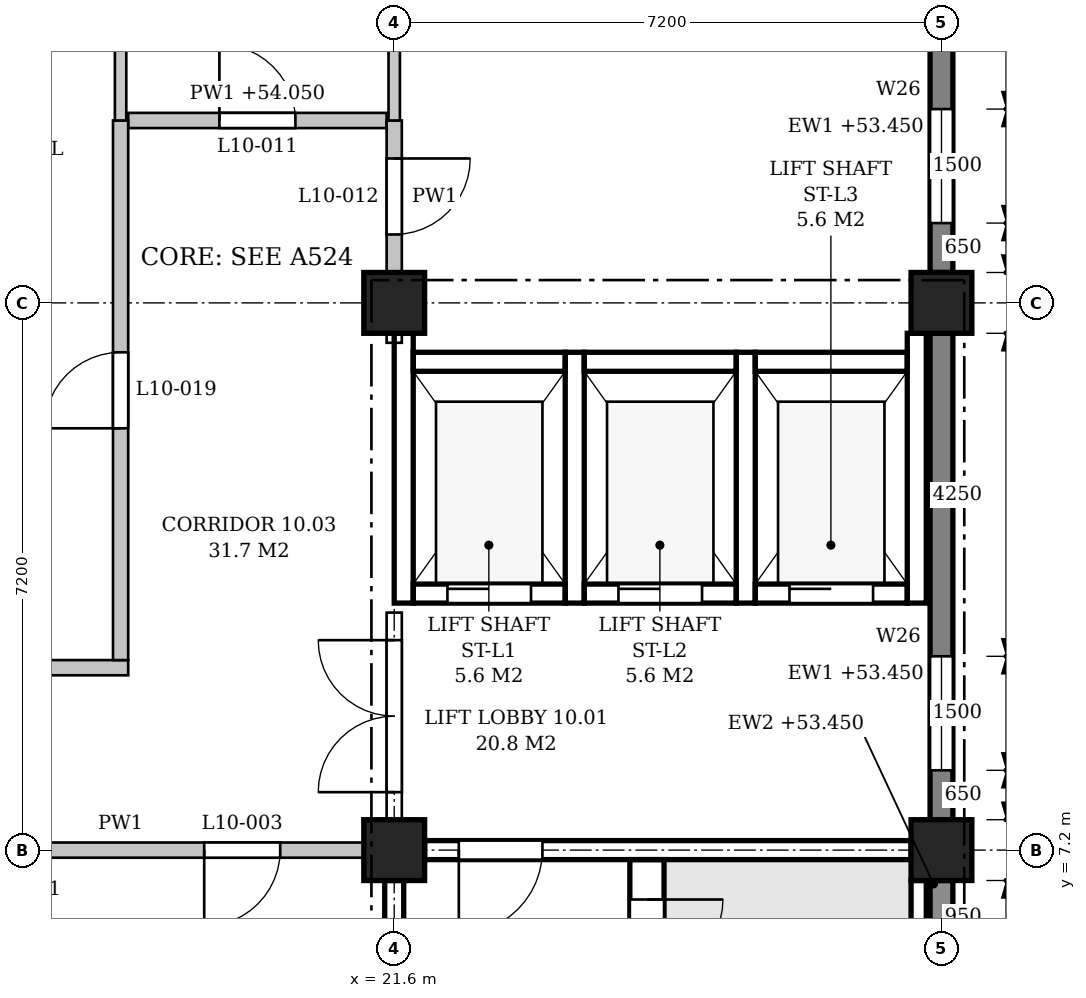
"""IFC4 building model, lengths in metres.
Left out: names, types, materials, properties, quantities, classifications, styles, units other than length and angle.
Written with IfcOpenShell. Run it as: python <this file> out.ifc"""

import sys

from ifc_helpers import new_model, si_unit, direction, frame, frame_2d, origin, origin_2d, place, context, subcontext, project, spatial, polyline, rectangle, outline, extrude, element, fill, save


model = new_model("IFC4")
c1 = context("Model", 3, precision=1e-05, world=origin(), true_north=direction((0.0, 1.0)))
c2 = subcontext(c1, "Body", "Model", "MODEL_VIEW")
j1 = project(units=[si_unit("LENGTHUNIT", "METRE"), si_unit("PLANEANGLEUNIT", "RADIAN")], contexts=[c1])
p1 = place(None, origin())
s1 = spatial("IfcSite", under=j1, at=p1, CompositionType="ELEMENT")
p2 = place(p1, origin())
s2 = spatial("IfcBuilding", under=s1, at=p2, CompositionType="ELEMENT")
p3 = place(p2, frame((0.0, 0.0, 49.8)))
s3 = spatial("IfcBuildingStorey", under=s2, at=p3, CompositionType="ELEMENT", Elevation=49.8)
for number, where, z_axis, x_axis in (
    (1, (21.6, 7.2, 0.0), (0.0, 0.0, 1.0), (1.0, 0.0, 0.0)),
    (2, (21.6, 14.4, 0.0), (0.0, 0.0, 1.0), (1.0, 0.0, 0.0)),
    (3, (28.8, 7.2, 0.0), (0.0, 0.0, 1.0), (1.0, 0.0, 0.0)),
    (4, (28.8, 14.4, 0.0), (0.0, 0.0, 1.0), (1.0, 0.0, 0.0)),
):
    element("IfcColumn", number, at=place(p3, frame(where, z_axis=z_axis, x_axis=x_axis)), inside=s3, PredefinedType="COLUMN", context=c2, shape_type="SweptSolid", body=[
        extrude(rectangle(XDim=0.8, YDim=0.8, at=origin_2d()), origin(), (0.0, 0.0, 1.0), 4.5),
    ])
p4 = place(p3, frame((28.8, 0.4, 0.0), z_axis=(0.0, 0.0, 1.0), x_axis=(0.0, 1.0, 0.0)))
e5 = element("IfcWall", 5, at=p4, inside=s3, PredefinedType="STANDARD", context=c2, shape_type="SweptSolid", body=[
    extrude(rectangle(XDim=6.4, YDim=0.3, at=frame_2d((3.2, 0.0))), origin(), (0.0, 0.0, 1.0), 3.65),
])
p5 = place(p4, frame((0.95, 0.0, 0.9)))
e6 = element("IfcOpeningElement", 6, at=p5, cuts=e5, PredefinedType="OPENING", context=c2, shape_type="SweptSolid", body=[
    extrude(outline(polyline([(0.0, 0.0), (0.9, 0.0), (0.9, 2.15), (0.45, 2.6), (0.0, 2.15), (0.0, 0.0)])), frame((0.0, 0.16, 0.0), z_axis=(0.0, -1.0, 0.0), x_axis=(1.0, 0.0, 0.0)), (0.0, 0.0, 1.0), 0.32),
])
p6 = place(p4, frame((4.55, 0.0, 0.9)))
e7 = element("IfcOpeningElement", 7, at=p6, cuts=e5, PredefinedType="OPENING", context=c2, shape_type="SweptSolid", body=[
    extrude(outline(polyline([(0.0, 0.0), (0.9, 0.0), (0.9, 2.15), (0.45, 2.6), (0.0, 2.15), (0.0, 0.0)])), frame((0.0, 0.16, 0.0), z_axis=(0.0, -1.0, 0.0), x_axis=(1.0, 0.0, 0.0)), (0.0, 0.0, 1.0), 0.32),
])
p7 = place(p3, frame((28.8, 7.6, 0.0), z_axis=(0.0, 0.0, 1.0), x_axis=(0.0, 1.0, 0.0)))
e8 = element("IfcWall", 8, at=p7, inside=s3, PredefinedType="STANDARD", context=c2, shape_type="SweptSolid", body=[
    extrude(rectangle(XDim=6.4, YDim=0.3, at=frame_2d((3.2, 0.0))), origin(), (0.0, 0.0, 1.0), 3.65),
])
p8 = place(p7, frame((0.65, 0.0, 0.9)))
e9 = element("IfcOpeningElement", 9, at=p8, cuts=e8, PredefinedType="OPENING", context=c2, shape_type="SweptSolid", body=[
    extrude(outline(polyline([(0.0, 0.0), (1.5, 0.0), (1.5, 1.85), (0.75, 2.6), (0.0, 1.85), (0.0, 0.0)])), frame((0.0, 0.16, 0.0), z_axis=(0.0, -1.0, 0.0), x_axis=(1.0, 0.0, 0.0)), (0.0, 0.0, 1.0), 0.32),
])
p9 = place(p3, frame((28.8, 14.8, 0.0), z_axis=(0.0, 0.0, 1.0), x_axis=(0.0, 1.0, 0.0)))
e10 = element("IfcWall", 10, at=p9, inside=s3, PredefinedType="STANDARD", context=c2, shape_type="SweptSolid", body=[
    extrude(rectangle(XDim=6.4, YDim=0.3, at=frame_2d((3.2, 0.0))), origin(), (0.0, 0.0, 1.0), 3.65),
])
p10 = place(p9, frame((0.65, 0.0, 0.9)))
e11 = element("IfcOpeningElement", 11, at=p10, cuts=e10, PredefinedType="OPENING", context=c2, shape_type="SweptSolid", body=[
    extrude(outline(polyline([(0.0, 0.0), (1.5, 0.0), (1.5, 1.85), (0.75, 2.6), (0.0, 1.85), (0.0, 0.0)])), frame((0.0, 0.16, 0.0), z_axis=(0.0, -1.0, 0.0), x_axis=(1.0, 0.0, 0.0)), (0.0, 0.0, 1.0), 0.32),
])
p11 = place(p9, frame((4.25, 0.0, 0.9)))
e12 = element("IfcOpeningElement", 12, at=p11, cuts=e10, PredefinedType="OPENING", context=c2, shape_type="SweptSolid", body=[
    extrude(outline(polyline([(0.0, 0.0), (1.5, 0.0), (1.5, 1.85), (0.75, 2.6), (0.0, 1.85), (0.0, 0.0)])), frame((0.0, 0.16, 0.0), z_axis=(0.0, -1.0, 0.0), x_axis=(1.0, 0.0, 0.0)), (0.0, 0.0, 1.0), 0.32),
])
p12 = place(p3, frame((22.0, 7.2, 0.0), z_axis=(0.0, 0.0, 1.0), x_axis=(1.0, 0.0, 0.0)))
e13 = element("IfcWall", 13, at=p12, inside=s3, PredefinedType="SHEAR", context=c2, shape_type="SweptSolid", body=[
    extrude(rectangle(XDim=6.4, YDim=0.25, at=frame_2d((3.2, 0.0))), origin(), (0.0, 0.0, 1.0), 3.55),
])
p13 = place(p12, frame((0.45, 0.0, 0.0)))
e14 = element("IfcOpeningElement", 14, at=p13, cuts=e13, PredefinedType="OPENING", context=c2, shape_type="SweptSolid", body=[
    extrude(rectangle(XDim=1.1, YDim=2.1, at=frame_2d((0.55, 1.05))), frame((0.0, 0.135, 0.0), z_axis=(0.0, -1.0, 0.0), x_axis=(1.0, 0.0, 0.0)), (0.0, 0.0, 1.0), 0.27),
])
p14 = place(p3, frame((21.6, 0.4, 0.0), z_axis=(0.0, 0.0, 1.0), x_axis=(0.0, 1.0, 0.0)))
e15 = element("IfcWall", 15, at=p14, inside=s3, PredefinedType="SHEAR", context=c2, shape_type="SweptSolid", body=[
    extrude(rectangle(XDim=6.4, YDim=0.25, at=frame_2d((3.2, 0.0))), origin(), (0.0, 0.0, 1.0), 3.55),
])
p15 = place(p3, frame((28.5, 5.85, -0.25), z_axis=(0.0, 0.0, 1.0), x_axis=(0.0, 1.0, 0.0)))
e16 = element("IfcWall", 16, at=p15, inside=s3, PredefinedType="SHEAR", context=c2, shape_type="SweptSolid", body=[
    extrude(rectangle(XDim=0.95, YDim=0.2, at=frame_2d((0.475, 0.0))), origin(), (0.0, 0.0, 1.0), 4.5),
])
p16 = place(p3, frame((24.925, 0.15, 0.0), z_axis=(0.0, 0.0, 1.0), x_axis=(0.0, 1.0, 0.0)))
e17 = element("IfcWall", 17, at=p16, inside=s3, PredefinedType="SHEAR", context=c2, shape_type="SweptSolid", body=[
    extrude(rectangle(XDim=6.925, YDim=0.45, at=frame_2d((3.462, 0.0))), origin(), (0.0, 0.0, 1.0), 4.25),
])
p17 = place(p16, frame((5.4, 0.0, 0.0)))
e18 = element("IfcOpeningElement", 18, at=p17, cuts=e17, PredefinedType="OPENING", context=c2, shape_type="SweptSolid", body=[
    extrude(rectangle(XDim=1.0, YDim=2.1, at=frame_2d((0.5, 1.05))), frame((0.0, 0.235, 0.0), z_axis=(0.0, -1.0, 0.0), x_axis=(1.0, 0.0, 0.0)), (0.0, 0.0, 1.0), 0.47),
])
p18 = place(p3, frame((21.725, 10.45, -0.25), z_axis=(0.0, 0.0, 1.0), x_axis=(0.0, 1.0, 0.0)))
e19 = element("IfcWall", 19, at=p18, inside=s3, PredefinedType="SHEAR", context=c2, shape_type="SweptSolid", body=[
    extrude(rectangle(XDim=3.55, YDim=0.25, at=frame_2d((1.775, 0.0))), origin(), (0.0, 0.0, 1.0), 3.8),
])
for number, where, z_axis, x_axis in (
    (20, (23.975, 10.45, -0.25), (0.0, 0.0, 1.0), (0.0, 1.0, 0.0)),
    (21, (26.225, 10.45, -0.25), (0.0, 0.0, 1.0), (0.0, 1.0, 0.0)),
):
    element("IfcWall", number, at=place(p3, frame(where, z_axis=z_axis, x_axis=x_axis)), inside=s3, PredefinedType="SHEAR", context=c2, shape_type="SweptSolid", body=[
        extrude(rectangle(XDim=3.3, YDim=0.25, at=frame_2d((1.65, 0.0))), origin(), (0.0, 0.0, 1.0), 4.5),
    ])
p19 = place(p3, frame((28.475, 10.45, -0.25), z_axis=(0.0, 0.0, 1.0), x_axis=(0.0, 1.0, 0.0)))
e22 = element("IfcWall", 22, at=p19, inside=s3, PredefinedType="SHEAR", context=c2, shape_type="SweptSolid", body=[
    extrude(rectangle(XDim=3.55, YDim=0.25, at=frame_2d((1.775, 0.0))), origin(), (0.0, 0.0, 1.0), 4.5),
])
p20 = place(p3, frame((21.85, 10.575, -0.25), z_axis=(0.0, 0.0, 1.0), x_axis=(1.0, 0.0, 0.0)))
e23 = element("IfcWall", 23, at=p20, inside=s3, PredefinedType="SHEAR", context=c2, shape_type="SweptSolid", body=[
    extrude(rectangle(XDim=2.0, YDim=0.25, at=frame_2d((1.0, 0.0))), origin(), (0.0, 0.0, 1.0), 4.5),
])
p21 = place(p20, frame((0.45, 0.0, 0.25)))
e24 = element("IfcOpeningElement", 24, at=p21, cuts=e23, PredefinedType="OPENING", context=c2, shape_type="SweptSolid", body=[
    extrude(rectangle(XDim=1.1, YDim=2.1, at=frame_2d((0.55, 1.05))), frame((0.0, 0.135, 0.0), z_axis=(0.0, -1.0, 0.0), x_axis=(1.0, 0.0, 0.0)), (0.0, 0.0, 1.0), 0.27),
])
p22 = place(p3, frame((21.85, 13.625, -0.25), z_axis=(0.0, 0.0, 1.0), x_axis=(1.0, 0.0, 0.0)))
e25 = element("IfcWall", 25, at=p22, inside=s3, PredefinedType="SHEAR", context=c2, shape_type="SweptSolid", body=[
    extrude(rectangle(XDim=2.0, YDim=0.25, at=frame_2d((1.0, 0.0))), origin(), (0.0, 0.0, 1.0), 4.5),
])
p23 = place(p3, frame((24.1, 10.575, -0.25), z_axis=(0.0, 0.0, 1.0), x_axis=(1.0, 0.0, 0.0)))
e26 = element("IfcWall", 26, at=p23, inside=s3, PredefinedType="SHEAR", context=c2, shape_type="SweptSolid", body=[
    extrude(rectangle(XDim=2.0, YDim=0.25, at=frame_2d((1.0, 0.0))), origin(), (0.0, 0.0, 1.0), 4.5),
])
p24 = place(p23, frame((0.45, 0.0, 0.25)))
e27 = element("IfcOpeningElement", 27, at=p24, cuts=e26, PredefinedType="OPENING", context=c2, shape_type="SweptSolid", body=[
    extrude(rectangle(XDim=1.1, YDim=2.1, at=frame_2d((0.55, 1.05))), frame((0.0, 0.135, 0.0), z_axis=(0.0, -1.0, 0.0), x_axis=(1.0, 0.0, 0.0)), (0.0, 0.0, 1.0), 0.27),
])
p25 = place(p3, frame((24.1, 13.625, -0.25), z_axis=(0.0, 0.0, 1.0), x_axis=(1.0, 0.0, 0.0)))
e28 = element("IfcWall", 28, at=p25, inside=s3, PredefinedType="SHEAR", context=c2, shape_type="SweptSolid", body=[
    extrude(rectangle(XDim=2.0, YDim=0.25, at=frame_2d((1.0, 0.0))), origin(), (0.0, 0.0, 1.0), 4.5),
])
p26 = place(p3, frame((26.35, 10.575, -0.25), z_axis=(0.0, 0.0, 1.0), x_axis=(1.0, 0.0, 0.0)))
e29 = element("IfcWall", 29, at=p26, inside=s3, PredefinedType="SHEAR", context=c2, shape_type="SweptSolid", body=[
    extrude(rectangle(XDim=2.0, YDim=0.25, at=frame_2d((1.0, 0.0))), origin(), (0.0, 0.0, 1.0), 4.5),
])
p27 = place(p26, frame((0.45, 0.0, 0.25)))
e30 = element("IfcOpeningElement", 30, at=p27, cuts=e29, PredefinedType="OPENING", context=c2, shape_type="SweptSolid", body=[
    extrude(rectangle(XDim=1.1, YDim=2.1, at=frame_2d((0.55, 1.05))), frame((0.0, 0.135, 0.0), z_axis=(0.0, -1.0, 0.0), x_axis=(1.0, 0.0, 0.0)), (0.0, 0.0, 1.0), 0.27),
])
p28 = place(p3, frame((26.35, 13.625, -0.25), z_axis=(0.0, 0.0, 1.0), x_axis=(1.0, 0.0, 0.0)))
e31 = element("IfcWall", 31, at=p28, inside=s3, PredefinedType="SHEAR", context=c2, shape_type="SweptSolid", body=[
    extrude(rectangle(XDim=2.0, YDim=0.25, at=frame_2d((1.0, 0.0))), origin(), (0.0, 0.0, 1.0), 4.5),
])
p29 = place(p3, frame((14.8, 7.2, 0.0), z_axis=(0.0, 0.0, 1.0), x_axis=(1.0, 0.0, 0.0)))
e32 = element("IfcWall", 32, at=p29, inside=s3, PredefinedType="PARTITIONING", context=c2, shape_type="SweptSolid", body=[
    extrude(rectangle(XDim=6.4, YDim=0.2, at=frame_2d((3.2, 0.0))), origin(), (0.0, 0.0, 1.0), 3.55),
])
p30 = place(p29, frame((4.3, 0.0, 0.0)))
e33 = element("IfcOpeningElement", 33, at=p30, cuts=e32, PredefinedType="OPENING", context=c2, shape_type="SweptSolid", body=[
    extrude(rectangle(XDim=1.0, YDim=2.1, at=frame_2d((0.5, 1.05))), frame((0.0, 0.11, 0.0), z_axis=(0.0, -1.0, 0.0), x_axis=(1.0, 0.0, 0.0)), (0.0, 0.0, 1.0), 0.22),
])
p31 = place(p3, frame((3.5, 9.6, 0.0), z_axis=(0.0, 0.0, 1.0), x_axis=(1.0, 0.0, 0.0)))
e34 = element("IfcWall", 34, at=p31, inside=s3, PredefinedType="PARTITIONING", context=c2, shape_type="SweptSolid", body=[
    extrude(outline(polyline([(0.0, 0.0), (14.6, 0.0), (14.6, 4.25), (11.125, 4.25), (11.125, 3.55), (10.675, 3.55), (10.675, 4.25), (3.925, 4.25), (3.925, 3.55), (3.475, 3.55), (3.475, 4.25), (0.0, 4.25), (0.0, 0.0)])), frame((0.0, 0.1, 0.0), z_axis=(0.0, -1.0, 0.0), x_axis=(1.0, 0.0, 0.0)), (0.0, 0.0, 1.0), 0.2),
])
p32 = place(p31, frame((1.4, 0.0, 0.0)))
e35 = element("IfcOpeningElement", 35, at=p32, cuts=e34, PredefinedType="OPENING", context=c2, shape_type="SweptSolid", body=[
    extrude(rectangle(XDim=1.0, YDim=2.1, at=frame_2d((0.5, 1.05))), frame((0.0, 0.11, 0.0), z_axis=(0.0, -1.0, 0.0), x_axis=(1.0, 0.0, 0.0)), (0.0, 0.0, 1.0), 0.22),
])
p33 = place(p31, frame((6.8, 0.0, 0.0)))
e36 = element("IfcOpeningElement", 36, at=p33, cuts=e34, PredefinedType="OPENING", context=c2, shape_type="SweptSolid", body=[
    extrude(rectangle(XDim=1.0, YDim=2.1, at=frame_2d((0.5, 1.05))), frame((0.0, 0.11, 0.0), z_axis=(0.0, -1.0, 0.0), x_axis=(1.0, 0.0, 0.0)), (0.0, 0.0, 1.0), 0.22),
])
p34 = place(p3, frame((18.1, 16.8, 0.0), z_axis=(0.0, 0.0, 1.0), x_axis=(1.0, 0.0, 0.0)))
e37 = element("IfcWall", 37, at=p34, inside=s3, PredefinedType="PARTITIONING", context=c2, shape_type="SweptSolid", body=[
    extrude(outline(polyline([(0.0, 0.0), (3.4, 0.0), (3.4, 3.55), (3.275, 3.55), (3.275, 4.25), (0.0, 4.25), (0.0, 0.0)])), frame((0.0, 0.1, 0.0), z_axis=(0.0, -1.0, 0.0), x_axis=(1.0, 0.0, 0.0)), (0.0, 0.0, 1.0), 0.2),
])
p35 = place(p34, frame((1.2, 0.0, 0.0)))
e38 = element("IfcOpeningElement", 38, at=p35, cuts=e37, PredefinedType="OPENING", context=c2, shape_type="SweptSolid", body=[
    extrude(rectangle(XDim=1.0, YDim=2.1, at=frame_2d((0.5, 1.05))), frame((0.0, 0.11, 0.0), z_axis=(0.0, -1.0, 0.0), x_axis=(1.0, 0.0, 0.0)), (0.0, 0.0, 1.0), 0.22),
])
p36 = place(p3, frame((18.0, 9.7, 0.0), z_axis=(0.0, 0.0, 1.0), x_axis=(0.0, 1.0, 0.0)))
e39 = element("IfcWall", 39, at=p36, inside=s3, PredefinedType="PARTITIONING", context=c2, shape_type="SweptSolid", body=[
    extrude(outline(polyline([(0.0, 0.0), (7.1, 0.0), (7.1, 4.25), (4.925, 4.25), (4.925, 3.55), (4.475, 3.55), (4.475, 4.25), (0.0, 4.25), (0.0, 0.0)])), frame((0.0, 0.1, 0.0), z_axis=(0.0, -1.0, 0.0), x_axis=(1.0, 0.0, 0.0)), (0.0, 0.0, 1.0), 0.2),
])
p37 = place(p36, frame((3.05, 0.0, 0.0)))
e40 = element("IfcOpeningElement", 40, at=p37, cuts=e39, PredefinedType="OPENING", context=c2, shape_type="SweptSolid", body=[
    extrude(rectangle(XDim=1.0, YDim=2.1, at=frame_2d((0.5, 1.05))), frame((0.0, 0.11, 0.0), z_axis=(0.0, -1.0, 0.0), x_axis=(1.0, 0.0, 0.0)), (0.0, 0.0, 1.0), 0.22),
])
p38 = place(p3, frame((18.0, 16.8, 0.0), z_axis=(0.0, 0.0, 1.0), x_axis=(0.0, 1.0, 0.0)))
e41 = element("IfcWall", 41, at=p38, inside=s3, PredefinedType="PARTITIONING", context=c2, shape_type="SweptSolid", body=[
    extrude(rectangle(XDim=4.65, YDim=0.15, at=frame_2d((2.325, 0.0))), origin(), (0.0, 0.0, 1.0), 3.55),
])
p39 = place(p3, frame((21.6, 7.6, 0.0), z_axis=(0.0, 0.0, 1.0), x_axis=(0.0, 1.0, 0.0)))
e42 = element("IfcWall", 42, at=p39, inside=s3, PredefinedType="PARTITIONING", context=c2, shape_type="SweptSolid", body=[
    extrude(rectangle(XDim=2.725, YDim=0.2, at=frame_2d((1.362, 0.0))), origin(), (0.0, 0.0, 1.0), 3.55),
])
p40 = place(p39, frame((0.362, 0.0, 0.0)))
e43 = element("IfcOpeningElement", 43, at=p40, cuts=e42, PredefinedType="OPENING", context=c2, shape_type="SweptSolid", body=[
    extrude(rectangle(XDim=2.0, YDim=2.4, at=frame_2d((1.0, 1.2))), frame((0.0, 0.11, 0.0), z_axis=(0.0, -1.0, 0.0), x_axis=(1.0, 0.0, 0.0)), (0.0, 0.0, 1.0), 0.22),
])
p41 = place(p3, frame((21.6, 13.875, 0.0), z_axis=(0.0, 0.0, 1.0), x_axis=(0.0, 1.0, 0.0)))
e44 = element("IfcWall", 44, at=p41, inside=s3, PredefinedType="PARTITIONING", context=c2, shape_type="SweptSolid", body=[
    extrude(rectangle(XDim=0.125, YDim=0.2, at=frame_2d((0.062, 0.0))), origin(), (0.0, 0.0, 1.0), 3.55),
])
p42 = place(p3, frame((21.6, 14.8, 0.0), z_axis=(0.0, 0.0, 1.0), x_axis=(0.0, 1.0, 0.0)))
e45 = element("IfcWall", 45, at=p42, inside=s3, PredefinedType="PARTITIONING", context=c2, shape_type="SweptSolid", body=[
    extrude(rectangle(XDim=2.0, YDim=0.2, at=frame_2d((1.0, 0.0))), origin(), (0.0, 0.0, 1.0), 3.55),
])
p43 = place(p42, frame((0.5, 0.0, 0.0)))
e46 = element("IfcOpeningElement", 46, at=p43, cuts=e45, PredefinedType="OPENING", context=c2, shape_type="SweptSolid", body=[
    extrude(rectangle(XDim=1.0, YDim=2.1, at=frame_2d((0.5, 1.05))), frame((0.0, 0.11, 0.0), z_axis=(0.0, -1.0, 0.0), x_axis=(1.0, 0.0, 0.0)), (0.0, 0.0, 1.0), 0.22),
])
p44 = place(p3, frame((21.6, 16.8, 0.0), z_axis=(0.0, 0.0, 1.0), x_axis=(0.0, 1.0, 0.0)))
e47 = element("IfcWall", 47, at=p44, inside=s3, PredefinedType="PARTITIONING", context=c2, shape_type="SweptSolid", body=[
    extrude(rectangle(XDim=4.4, YDim=0.15, at=frame_2d((2.2, 0.0))), origin(), (0.0, 0.0, 1.0), 3.55),
])
p45 = place(p8, origin())
e48 = element("IfcWindow", 48, at=p45, inside=s3, PartitioningType="SINGLE_PANEL", PredefinedType="WINDOW", context=c2, shape_type="SweptSolid", body=[
    extrude(outline(polyline([(0.0, 0.0), (1.5, 0.0), (1.5, 1.85), (0.75, 2.6), (0.0, 1.85), (0.0, 0.0)])), frame((0.0, 0.03, 0.0), z_axis=(0.0, -1.0, 0.0), x_axis=(1.0, 0.0, 0.0)), (0.0, 0.0, 1.0), 0.06),
])
fill(e9, e48)
p46 = place(p10, origin())
e49 = element("IfcWindow", 49, at=p46, inside=s3, PartitioningType="SINGLE_PANEL", PredefinedType="WINDOW", context=c2, shape_type="SweptSolid", body=[
    extrude(outline(polyline([(0.0, 0.0), (1.5, 0.0), (1.5, 1.85), (0.75, 2.6), (0.0, 1.85), (0.0, 0.0)])), frame((0.0, 0.03, 0.0), z_axis=(0.0, -1.0, 0.0), x_axis=(1.0, 0.0, 0.0)), (0.0, 0.0, 1.0), 0.06),
])
fill(e11, e49)
p47 = place(p17, frame((1.0, 0.0, 0.0), z_axis=(0.0, 0.0, 1.0), x_axis=(-1.0, 0.0, 0.0)))
e50 = element("IfcDoor", 50, at=p47, inside=s3, OperationType="SINGLE_SWING_LEFT", PredefinedType="DOOR", context=c2, shape_type="SweptSolid", body=[
    extrude(rectangle(XDim=1.0, YDim=2.1, at=frame_2d((0.5, 1.05))), frame((0.0, 0.025, 0.0), z_axis=(0.0, -1.0, 0.0), x_axis=(1.0, 0.0, 0.0)), (0.0, 0.0, 1.0), 0.05),
])
fill(e18, e50)
p48 = place(p13, frame((1.1, 0.0, 0.0), z_axis=(0.0, 0.0, 1.0), x_axis=(-1.0, 0.0, 0.0)))
e51 = element("IfcDoor", 51, at=p48, inside=s3, OperationType="SINGLE_SWING_RIGHT", PredefinedType="DOOR", context=c2, shape_type="SweptSolid", body=[
    extrude(rectangle(XDim=1.1, YDim=2.1, at=frame_2d((0.55, 1.05))), frame((0.0, 0.025, 0.0), z_axis=(0.0, -1.0, 0.0), x_axis=(1.0, 0.0, 0.0)), (0.0, 0.0, 1.0), 0.05),
])
fill(e14, e51)
p49 = place(p21, origin())
e52 = element("IfcDoor", 52, at=p49, inside=s3, OperationType="SLIDING_TO_LEFT", PredefinedType="DOOR", context=c2, shape_type="SweptSolid", body=[
    extrude(rectangle(XDim=1.1, YDim=2.1, at=frame_2d((0.55, 1.05))), frame((0.0, 0.025, 0.0), z_axis=(0.0, -1.0, 0.0), x_axis=(1.0, 0.0, 0.0)), (0.0, 0.0, 1.0), 0.05),
])
fill(e24, e52)
p50 = place(p24, origin())
e53 = element("IfcDoor", 53, at=p50, inside=s3, OperationType="SLIDING_TO_LEFT", PredefinedType="DOOR", context=c2, shape_type="SweptSolid", body=[
    extrude(rectangle(XDim=1.1, YDim=2.1, at=frame_2d((0.55, 1.05))), frame((0.0, 0.025, 0.0), z_axis=(0.0, -1.0, 0.0), x_axis=(1.0, 0.0, 0.0)), (0.0, 0.0, 1.0), 0.05),
])
fill(e27, e53)
p51 = place(p27, origin())
e54 = element("IfcDoor", 54, at=p51, inside=s3, OperationType="SLIDING_TO_LEFT", PredefinedType="DOOR", context=c2, shape_type="SweptSolid", body=[
    extrude(rectangle(XDim=1.1, YDim=2.1, at=frame_2d((0.55, 1.05))), frame((0.0, 0.025, 0.0), z_axis=(0.0, -1.0, 0.0), x_axis=(1.0, 0.0, 0.0)), (0.0, 0.0, 1.0), 0.05),
])
fill(e30, e54)
p52 = place(p40, origin())
e55 = element("IfcDoor", 55, at=p52, inside=s3, OperationType="DOUBLE_DOOR_SINGLE_SWING", PredefinedType="DOOR", context=c2, shape_type="SweptSolid", body=[
    extrude(rectangle(XDim=2.0, YDim=2.4, at=frame_2d((1.0, 1.2))), frame((0.0, 0.025, 0.0), z_axis=(0.0, -1.0, 0.0), x_axis=(1.0, 0.0, 0.0)), (0.0, 0.0, 1.0), 0.05),
])
fill(e43, e55)
p53 = place(p30, frame((1.0, 0.0, 0.0), z_axis=(0.0, 0.0, 1.0), x_axis=(-1.0, 0.0, 0.0)))
e56 = element("IfcDoor", 56, at=p53, inside=s3, OperationType="SINGLE_SWING_RIGHT", PredefinedType="DOOR", context=c2, shape_type="SweptSolid", body=[
    extrude(rectangle(XDim=1.0, YDim=2.1, at=frame_2d((0.5, 1.05))), frame((0.0, 0.025, 0.0), z_axis=(0.0, -1.0, 0.0), x_axis=(1.0, 0.0, 0.0)), (0.0, 0.0, 1.0), 0.05),
])
fill(e33, e56)
p54 = place(p35, origin())
e57 = element("IfcDoor", 57, at=p54, inside=s3, OperationType="SINGLE_SWING_LEFT", PredefinedType="DOOR", context=c2, shape_type="SweptSolid", body=[
    extrude(rectangle(XDim=1.0, YDim=2.1, at=frame_2d((0.5, 1.05))), frame((0.0, 0.025, 0.0), z_axis=(0.0, -1.0, 0.0), x_axis=(1.0, 0.0, 0.0)), (0.0, 0.0, 1.0), 0.05),
])
fill(e38, e57)
p55 = place(p43, frame((1.0, 0.0, 0.0), z_axis=(0.0, 0.0, 1.0), x_axis=(-1.0, 0.0, 0.0)))
e58 = element("IfcDoor", 58, at=p55, inside=s3, OperationType="SINGLE_SWING_LEFT", PredefinedType="DOOR", context=c2, shape_type="SweptSolid", body=[
    extrude(rectangle(XDim=1.0, YDim=2.1, at=frame_2d((0.5, 1.05))), frame((0.0, 0.025, 0.0), z_axis=(0.0, -1.0, 0.0), x_axis=(1.0, 0.0, 0.0)), (0.0, 0.0, 1.0), 0.05),
])
fill(e46, e58)
p56 = place(p37, origin())
e59 = element("IfcDoor", 59, at=p56, inside=s3, OperationType="SINGLE_SWING_LEFT", PredefinedType="DOOR", context=c2, shape_type="SweptSolid", body=[
    extrude(rectangle(XDim=1.0, YDim=2.1, at=frame_2d((0.5, 1.05))), frame((0.0, 0.025, 0.0), z_axis=(0.0, -1.0, 0.0), x_axis=(1.0, 0.0, 0.0)), (0.0, 0.0, 1.0), 0.05),
])
fill(e40, e59)
save(model, sys.argv[1])
